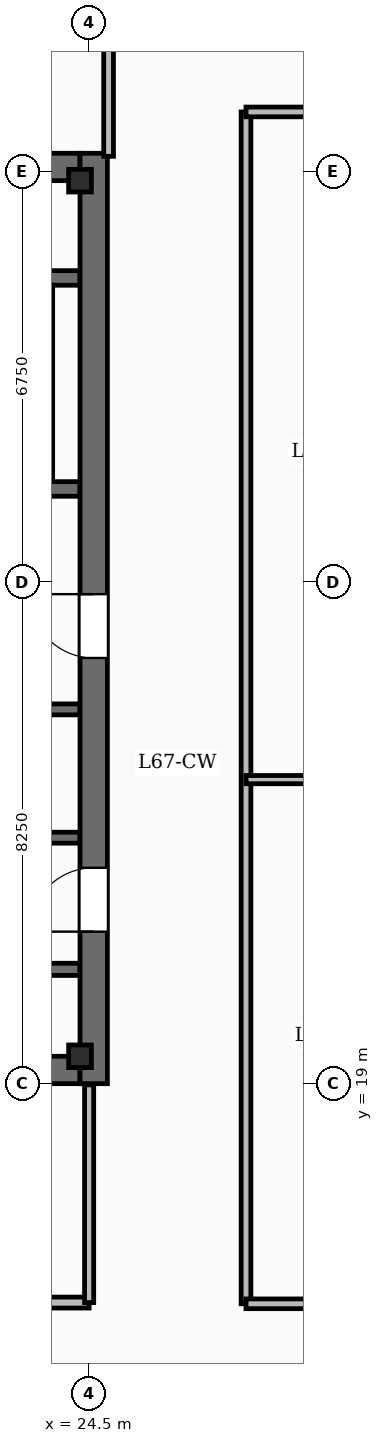
"""IFC4 building model, lengths in metres.
Left out: names, types, materials, properties, quantities, classifications, styles, units other than length and angle.
Written with IfcOpenShell. Run it as: python <this file> out.ifc"""

import sys

from ifc_helpers import new_model, si_unit, direction, frame, frame_2d, origin, origin_2d, place, context, subcontext, project, spatial, rectangle, i_section, extrude, element, fill, save


model = new_model("IFC4")
c1 = context("Model", 3, precision=1e-05, world=origin(), true_north=direction((0.0, 1.0)))
c2 = subcontext(c1, "Body", "Model", "MODEL_VIEW")
j1 = project(units=[si_unit("LENGTHUNIT", "METRE"), si_unit("PLANEANGLEUNIT", "RADIAN")], contexts=[c1])
p1 = place(None, origin())
s1 = spatial("IfcSite", under=j1, at=p1, CompositionType="ELEMENT")
p2 = place(p1, origin())
s2 = spatial("IfcBuilding", under=s1, at=p2, CompositionType="ELEMENT")
p3 = place(p2, frame((0.0, 0.0, 274.9)))
s3 = spatial("IfcBuildingStorey", under=s2, at=p3, CompositionType="ELEMENT", Elevation=274.9)
p4 = place(p3, frame((24.575, 19.0, -0.45), z_axis=(0.0, 0.0, 1.0), x_axis=(0.0, 1.0, 0.0)))
e1 = element("IfcWall", 1, at=p4, inside=s3, PredefinedType="SHEAR", context=c2, shape_type="SweptSolid", body=[
    extrude(rectangle(XDim=15.3, YDim=0.45, at=frame_2d((7.65, 0.0))), origin(), (0.0, 0.0, 1.0), 3.93),
])
p5 = place(p4, frame((2.5, 0.0, 0.45)))
e2 = element("IfcOpeningElement", 2, at=p5, cuts=e1, PredefinedType="OPENING", context=c2, shape_type="SweptSolid", body=[
    extrude(rectangle(XDim=1.05, YDim=2.15, at=frame_2d((0.525, 1.075))), frame((0.0, 0.235, 0.0), z_axis=(0.0, -1.0, 0.0), x_axis=(1.0, 0.0, 0.0)), (0.0, 0.0, 1.0), 0.47),
])
p6 = place(p4, frame((7.0, 0.0, 0.45)))
e3 = element("IfcOpeningElement", 3, at=p6, cuts=e1, PredefinedType="OPENING", context=c2, shape_type="SweptSolid", body=[
    extrude(rectangle(XDim=1.05, YDim=2.15, at=frame_2d((0.525, 1.075))), frame((0.0, 0.235, 0.0), z_axis=(0.0, -1.0, 0.0), x_axis=(1.0, 0.0, 0.0)), (0.0, 0.0, 1.0), 0.47),
])
for number, where, z_axis, x_axis in (
    (4, (14.55, 19.225, -0.45), (0.0, 0.0, 1.0), (1.0, 0.0, 0.0)),
    (5, (14.55, 34.075, -0.45), (0.0, 0.0, 1.0), (1.0, 0.0, 0.0)),
):
    element("IfcWall", number, at=place(p3, frame(where, z_axis=z_axis, x_axis=x_axis)), inside=s3, PredefinedType="SHEAR", context=c2, shape_type="SweptSolid", body=[
        extrude(rectangle(XDim=9.8, YDim=0.45, at=frame_2d((4.9, 0.0))), origin(), (0.0, 0.0, 1.0), 3.93),
    ])
for number, where, z_axis, x_axis in (
    (6, (24.35, 19.45, -0.45), (0.0, 0.0, 1.0), (1.0, 0.0, 0.0)),
    (7, (24.35, 33.85, -0.45), (0.0, 0.0, 1.0), (1.0, 0.0, 0.0)),
):
    element("IfcColumn", number, at=place(p3, frame(where, z_axis=z_axis, x_axis=x_axis)), inside=s3, PredefinedType="COLUMN", context=c2, shape_type="SweptSolid", body=[
        extrude(i_section(OverallWidth=0.374, OverallDepth=0.372, WebThickness=0.016, FlangeThickness=0.026, FilletRadius=0.02, at=origin_2d()), origin(), (0.0, 0.0, 1.0), 3.93),
    ])
p7 = place(p3, frame((24.35, 28.78, 0.0), z_axis=(0.0, 0.0, 1.0), x_axis=(-1.0, 0.0, 0.0)))
e8 = element("IfcWall", 8, at=p7, inside=s3, PredefinedType="SOLIDWALL", context=c2, shape_type="SweptSolid", body=[
    extrude(rectangle(XDim=9.8, YDim=0.24, at=frame_2d((4.9, 0.0))), origin(), (0.0, 0.0, 1.0), 3.48),
])
p8 = place(p7, frame((7.83, 0.0, 0.0)))
e9 = element("IfcOpeningElement", 9, at=p8, cuts=e8, PredefinedType="OPENING", context=c2, shape_type="SweptSolid", body=[
    extrude(rectangle(XDim=1.1, YDim=2.15, at=frame_2d((0.55, 1.075))), frame((0.0, 0.13, 0.0), z_axis=(0.0, -1.0, 0.0), x_axis=(1.0, 0.0, 0.0)), (0.0, 0.0, 1.0), 0.26),
])
p9 = place(p3, frame((14.55, 32.25, 0.0), z_axis=(0.0, 0.0, 1.0), x_axis=(1.0, 0.0, 0.0)))
e10 = element("IfcWall", 10, at=p9, inside=s3, PredefinedType="SOLIDWALL", context=c2, shape_type="SweptSolid", body=[
    extrude(rectangle(XDim=9.8, YDim=0.24, at=frame_2d((4.9, 0.0))), origin(), (0.0, 0.0, 1.0), 3.48),
])
p10 = place(p3, frame((23.78, 28.9, 0.0), z_axis=(0.0, 0.0, 1.0), x_axis=(0.0, 1.0, 0.0)))
e11 = element("IfcWall", 11, at=p10, inside=s3, PredefinedType="SOLIDWALL", context=c2, shape_type="SweptSolid", body=[
    extrude(rectangle(XDim=3.23, YDim=0.24, at=frame_2d((1.615, 0.0))), origin(), (0.0, 0.0, 1.0), 3.48),
])
for number, where, z_axis, x_axis in (
    (12, (20.95, 25.155, 0.0), (0.0, 0.0, 1.0), (1.0, 0.0, 0.0)),
    (13, (20.95, 23.045, 0.0), (0.0, 0.0, 1.0), (1.0, 0.0, 0.0)),
):
    element("IfcWall", number, at=place(p3, frame(where, z_axis=z_axis, x_axis=x_axis)), inside=s3, PredefinedType="SOLIDWALL", context=c2, shape_type="SweptSolid", body=[
        extrude(rectangle(XDim=3.4, YDim=0.18, at=frame_2d((1.7, 0.0))), origin(), (0.0, 0.0, 1.0), 3.48),
    ])
p11 = place(p3, frame((14.55, 20.88, 0.0), z_axis=(0.0, 0.0, 1.0), x_axis=(1.0, 0.0, 0.0)))
e14 = element("IfcWall", 14, at=p11, inside=s3, PredefinedType="SOLIDWALL", context=c2, shape_type="SweptSolid", body=[
    extrude(rectangle(XDim=9.8, YDim=0.2, at=frame_2d((4.9, 0.0))), origin(), (0.0, 0.0, 1.0), 2.54),
])
p12 = place(p11, frame((3.4, 0.0, 0.0)))
e15 = element("IfcOpeningElement", 15, at=p12, cuts=e14, PredefinedType="OPENING", context=c2, shape_type="SweptSolid", body=[
    extrude(rectangle(XDim=1.05, YDim=2.15, at=frame_2d((0.525, 1.075))), frame((0.0, 0.11, 0.0), z_axis=(0.0, -1.0, 0.0), x_axis=(1.0, 0.0, 0.0)), (0.0, 0.0, 1.0), 0.22),
])
p13 = place(p3, frame((14.6, 15.4, 0.0), z_axis=(0.0, 0.0, 1.0), x_axis=(1.0, 0.0, 0.0)))
e16 = element("IfcWall", 16, at=p13, inside=s3, PredefinedType="PARTITIONING", context=c2, shape_type="SweptSolid", body=[
    extrude(rectangle(XDim=9.9, YDim=0.18, at=frame_2d((4.95, 0.0))), origin(), (0.0, 0.0, 1.0), 2.54),
])
p14 = place(p13, frame((0.74, 0.0, 0.0)))
e17 = element("IfcOpeningElement", 17, at=p14, cuts=e16, PredefinedType="OPENING", context=c2, shape_type="SweptSolid", body=[
    extrude(rectangle(XDim=0.92, YDim=2.1, at=frame_2d((0.46, 1.05))), frame((0.0, 0.1, 0.0), z_axis=(0.0, -1.0, 0.0), x_axis=(1.0, 0.0, 0.0)), (0.0, 0.0, 1.0), 0.2),
])
p15 = place(p13, frame((3.19, 0.0, 0.0)))
e18 = element("IfcOpeningElement", 18, at=p15, cuts=e16, PredefinedType="OPENING", context=c2, shape_type="SweptSolid", body=[
    extrude(rectangle(XDim=0.92, YDim=2.1, at=frame_2d((0.46, 1.05))), frame((0.0, 0.1, 0.0), z_axis=(0.0, -1.0, 0.0), x_axis=(1.0, 0.0, 0.0)), (0.0, 0.0, 1.0), 0.2),
])
p16 = place(p13, frame((5.69, 0.0, 0.0)))
e19 = element("IfcOpeningElement", 19, at=p16, cuts=e16, PredefinedType="OPENING", context=c2, shape_type="SweptSolid", body=[
    extrude(rectangle(XDim=0.92, YDim=2.1, at=frame_2d((0.46, 1.05))), frame((0.0, 0.1, 0.0), z_axis=(0.0, -1.0, 0.0), x_axis=(1.0, 0.0, 0.0)), (0.0, 0.0, 1.0), 0.2),
])
p17 = place(p13, frame((8.19, 0.0, 0.0)))
e20 = element("IfcOpeningElement", 20, at=p17, cuts=e16, PredefinedType="OPENING", context=c2, shape_type="SweptSolid", body=[
    extrude(rectangle(XDim=0.92, YDim=2.1, at=frame_2d((0.46, 1.05))), frame((0.0, 0.1, 0.0), z_axis=(0.0, -1.0, 0.0), x_axis=(1.0, 0.0, 0.0)), (0.0, 0.0, 1.0), 0.2),
])
p18 = place(p3, frame((24.5, 15.4, 0.0), z_axis=(0.0, 0.0, 1.0), x_axis=(0.0, 1.0, 0.0)))
e21 = element("IfcWall", 21, at=p18, inside=s3, PredefinedType="PARTITIONING", context=c2, shape_type="SweptSolid", body=[
    extrude(rectangle(XDim=3.58, YDim=0.15, at=frame_2d((1.79, 0.0))), origin(), (0.0, 0.0, 1.0), 2.54),
])
p19 = place(p3, frame((24.82, 34.25, 0.0), z_axis=(0.0, 0.0, 1.0), x_axis=(0.0, 1.0, 0.0)))
e22 = element("IfcWall", 22, at=p19, inside=s3, PredefinedType="PARTITIONING", context=c2, shape_type="SweptSolid", body=[
    extrude(rectangle(XDim=2.97, YDim=0.16, at=frame_2d((1.485, 0.0))), origin(), (0.0, 0.0, 1.0), 2.54),
])
p20 = place(p3, frame((27.08, 24.0, 0.0), z_axis=(0.0, 0.0, 1.0), x_axis=(1.0, 0.0, 0.0)))
e23 = element("IfcWall", 23, at=p20, inside=s3, PredefinedType="PARTITIONING", context=c2, shape_type="SweptSolid", body=[
    extrude(rectangle(XDim=20.74, YDim=0.135, at=frame_2d((10.37, 0.0))), origin(), (0.0, 0.0, 1.0), 2.54),
])
p21 = place(p3, frame((27.08, 34.98, 0.0), z_axis=(0.0, 0.0, 1.0), x_axis=(1.0, 0.0, 0.0)))
e24 = element("IfcWall", 24, at=p21, inside=s3, PredefinedType="PARTITIONING", context=c2, shape_type="SweptSolid", body=[
    extrude(rectangle(XDim=20.74, YDim=0.16, at=frame_2d((10.37, 0.0))), origin(), (0.0, 0.0, 1.0), 2.54),
])
p22 = place(p21, frame((0.995, 0.0, 0.0)))
e25 = element("IfcOpeningElement", 25, at=p22, cuts=e24, PredefinedType="OPENING", context=c2, shape_type="SweptSolid", body=[
    extrude(rectangle(XDim=0.95, YDim=2.15, at=frame_2d((0.475, 1.075))), frame((0.0, 0.09, 0.0), z_axis=(0.0, -1.0, 0.0), x_axis=(1.0, 0.0, 0.0)), (0.0, 0.0, 1.0), 0.18),
])
p23 = place(p21, frame((6.695, 0.0, 0.0)))
e26 = element("IfcOpeningElement", 26, at=p23, cuts=e24, PredefinedType="OPENING", context=c2, shape_type="SweptSolid", body=[
    extrude(rectangle(XDim=0.95, YDim=2.15, at=frame_2d((0.475, 1.075))), frame((0.0, 0.09, 0.0), z_axis=(0.0, -1.0, 0.0), x_axis=(1.0, 0.0, 0.0)), (0.0, 0.0, 1.0), 0.18),
])
p24 = place(p21, frame((13.945, 0.0, 0.0)))
e27 = element("IfcOpeningElement", 27, at=p24, cuts=e24, PredefinedType="OPENING", context=c2, shape_type="SweptSolid", body=[
    extrude(rectangle(XDim=0.95, YDim=2.15, at=frame_2d((0.475, 1.075))), frame((0.0, 0.09, 0.0), z_axis=(0.0, -1.0, 0.0), x_axis=(1.0, 0.0, 0.0)), (0.0, 0.0, 1.0), 0.18),
])
p25 = place(p21, frame((18.595, 0.0, 0.0)))
e28 = element("IfcOpeningElement", 28, at=p25, cuts=e24, PredefinedType="OPENING", context=c2, shape_type="SweptSolid", body=[
    extrude(rectangle(XDim=0.95, YDim=2.15, at=frame_2d((0.475, 1.075))), frame((0.0, 0.09, 0.0), z_axis=(0.0, -1.0, 0.0), x_axis=(1.0, 0.0, 0.0)), (0.0, 0.0, 1.0), 0.18),
])
p26 = place(p3, frame((27.08, 15.38, 0.0), z_axis=(0.0, 0.0, 1.0), x_axis=(1.0, 0.0, 0.0)))
e29 = element("IfcWall", 29, at=p26, inside=s3, PredefinedType="PARTITIONING", context=c2, shape_type="SweptSolid", body=[
    extrude(rectangle(XDim=20.74, YDim=0.16, at=frame_2d((10.37, 0.0))), origin(), (0.0, 0.0, 1.0), 2.54),
])
p27 = place(p26, frame((0.995, 0.0, 0.0)))
e30 = element("IfcOpeningElement", 30, at=p27, cuts=e29, PredefinedType="OPENING", context=c2, shape_type="SweptSolid", body=[
    extrude(rectangle(XDim=0.95, YDim=2.15, at=frame_2d((0.475, 1.075))), frame((0.0, 0.09, 0.0), z_axis=(0.0, -1.0, 0.0), x_axis=(1.0, 0.0, 0.0)), (0.0, 0.0, 1.0), 0.18),
])
p28 = place(p26, frame((6.695, 0.0, 0.0)))
e31 = element("IfcOpeningElement", 31, at=p28, cuts=e29, PredefinedType="OPENING", context=c2, shape_type="SweptSolid", body=[
    extrude(rectangle(XDim=0.95, YDim=2.15, at=frame_2d((0.475, 1.075))), frame((0.0, 0.09, 0.0), z_axis=(0.0, -1.0, 0.0), x_axis=(1.0, 0.0, 0.0)), (0.0, 0.0, 1.0), 0.18),
])
p29 = place(p26, frame((13.945, 0.0, 0.0)))
e32 = element("IfcOpeningElement", 32, at=p29, cuts=e29, PredefinedType="OPENING", context=c2, shape_type="SweptSolid", body=[
    extrude(rectangle(XDim=0.95, YDim=2.15, at=frame_2d((0.475, 1.075))), frame((0.0, 0.09, 0.0), z_axis=(0.0, -1.0, 0.0), x_axis=(1.0, 0.0, 0.0)), (0.0, 0.0, 1.0), 0.18),
])
p30 = place(p26, frame((18.595, 0.0, 0.0)))
e33 = element("IfcOpeningElement", 33, at=p30, cuts=e29, PredefinedType="OPENING", context=c2, shape_type="SweptSolid", body=[
    extrude(rectangle(XDim=0.95, YDim=2.15, at=frame_2d((0.475, 1.075))), frame((0.0, 0.09, 0.0), z_axis=(0.0, -1.0, 0.0), x_axis=(1.0, 0.0, 0.0)), (0.0, 0.0, 1.0), 0.18),
])
p31 = place(p3, frame((27.08, 15.38, 0.0), z_axis=(0.0, 0.0, 1.0), x_axis=(0.0, 1.0, 0.0)))
e34 = element("IfcWall", 34, at=p31, inside=s3, PredefinedType="PARTITIONING", context=c2, shape_type="SweptSolid", body=[
    extrude(rectangle(XDim=19.6, YDim=0.16, at=frame_2d((9.8, 0.0))), origin(), (0.0, 0.0, 1.0), 2.54),
])
p32 = place(p5, origin())
e35 = element("IfcDoor", 35, at=p32, inside=s3, OperationType="SINGLE_SWING_LEFT", PredefinedType="DOOR", context=c2, shape_type="SweptSolid", body=[
    extrude(rectangle(XDim=1.05, YDim=2.15, at=frame_2d((0.525, 1.075))), frame((0.0, 0.025, 0.0), z_axis=(0.0, -1.0, 0.0), x_axis=(1.0, 0.0, 0.0)), (0.0, 0.0, 1.0), 0.05),
])
fill(e2, e35)
p33 = place(p6, origin())
e36 = element("IfcDoor", 36, at=p33, inside=s3, OperationType="SINGLE_SWING_RIGHT", PredefinedType="DOOR", context=c2, shape_type="SweptSolid", body=[
    extrude(rectangle(XDim=1.05, YDim=2.15, at=frame_2d((0.525, 1.075))), frame((0.0, 0.025, 0.0), z_axis=(0.0, -1.0, 0.0), x_axis=(1.0, 0.0, 0.0)), (0.0, 0.0, 1.0), 0.05),
])
fill(e3, e36)
save(model, sys.argv[1])
